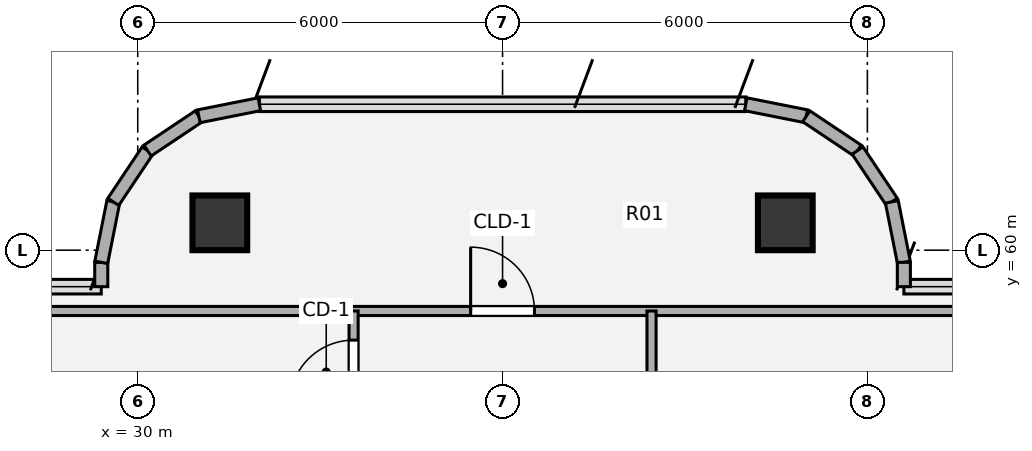
"""IFC4 building model, lengths in metres.
Left out: names, types, materials, properties, quantities, classifications, styles, units other than length and angle.
Written with IfcOpenShell. Run it as: python <this file> out.ifc"""

import sys

from ifc_helpers import new_model, si_unit, direction, frame, frame_2d, origin, origin_2d, place, context, subcontext, project, spatial, rectangle, hollow_circle, extrude, source, transform, mapped, element, fill, save


model = new_model("IFC4")
c1 = context("Model", 3, precision=1e-05, world=origin(), true_north=direction((0.0, 1.0)))
c2 = subcontext(c1, "Body", "Model", "MODEL_VIEW")
j1 = project(units=[si_unit("LENGTHUNIT", "METRE"), si_unit("PLANEANGLEUNIT", "RADIAN")], contexts=[c1])
p1 = place(None, origin())
s1 = spatial("IfcSite", under=j1, at=p1, CompositionType="ELEMENT")
p2 = place(p1, origin())
s2 = spatial("IfcBuilding", under=s1, at=p2, CompositionType="ELEMENT")
p3 = place(p2, frame((0.0, 0.0, 272.16)))
s3 = spatial("IfcBuildingStorey", under=s2, at=p3, CompositionType="ELEMENT", Elevation=272.16)
m1 = source(origin(), c2, "Body", "SweptSolid", [
    extrude(hollow_circle(Radius=0.45, WallThickness=0.032, at=origin_2d()), origin(), (0.0, 0.0, 1.0), 3.78),
])
for number, where, z_axis, x_axis in (
    (1, (31.35, 60.45, 0.0), (0.0, 0.0, 1.0), (1.0, 0.0, 0.0)),
    (2, (40.65, 60.45, 0.0), (0.0, 0.0, 1.0), (1.0, 0.0, 0.0)),
):
    element("IfcColumn", number, at=place(p3, frame(where, z_axis=z_axis, x_axis=x_axis)), inside=s3, PredefinedType="COLUMN", context=c2, shape_type="MappedRepresentation", body=[
        mapped(m1, transform((0.0, 0.0, 0.0), x_axis=(1.0, 0.0, 0.0), y_axis=(0.0, 1.0, 0.0), z_axis=(0.0, 0.0, 1.0), scale=1.0)),
    ])
p4 = place(p3, frame((29.4, 59.4, 0.0), z_axis=(0.0, 0.0, 1.0), x_axis=(0.0, 1.0, 0.0)))
e3 = element("IfcWall", 3, at=p4, inside=s3, PredefinedType="SOLIDWALL", context=c2, shape_type="SweptSolid", body=[
    extrude(rectangle(XDim=0.4, YDim=0.215, at=frame_2d((0.2, 0.0))), origin(), (0.0, 0.0, 1.0), 3.53),
])
p5 = place(p3, frame((29.4, 59.8, 0.0), z_axis=(0.0, 0.0, 1.0), x_axis=(0.195190360752, 0.980765376158, 0.0)))
e4 = element("IfcWall", 4, at=p5, inside=s3, PredefinedType="SOLIDWALL", context=c2, shape_type="SweptSolid", body=[
    extrude(rectangle(XDim=1.014, YDim=0.215, at=frame_2d((0.507, 0.0))), origin(), (0.0, 0.0, 1.0), 3.53),
])
p6 = place(p3, frame((29.598, 60.795, 0.0), z_axis=(0.0, 0.0, 1.0), x_axis=(0.555643898837, 0.831420385657, 0.0)))
e5 = element("IfcWall", 5, at=p6, inside=s3, PredefinedType="SOLIDWALL", context=c2, shape_type="SweptSolid", body=[
    extrude(rectangle(XDim=1.015, YDim=0.215, at=frame_2d((0.507, 0.0))), origin(), (0.0, 0.0, 1.0), 3.53),
])
p7 = place(p3, frame((30.162, 61.638, 0.0), z_axis=(0.0, 0.0, 1.0), x_axis=(0.831346067305, 0.555755086685, 0.0)))
e6 = element("IfcWall", 6, at=p7, inside=s3, PredefinedType="SOLIDWALL", context=c2, shape_type="SweptSolid", body=[
    extrude(rectangle(XDim=1.014, YDim=0.215, at=frame_2d((0.507, 0.0))), origin(), (0.0, 0.0, 1.0), 3.53),
])
for number, where, z_axis, x_axis in (
    (7, (31.005, 62.202, 0.0), (0.0, 0.0, 1.0), (0.981, 0.195, 0.0)),
    (8, (40.0, 62.4, 0.0), (0.0, 0.0, 1.0), (0.981, -0.195, 0.0)),
):
    element("IfcWall", number, at=place(p3, frame(where, z_axis=z_axis, x_axis=x_axis)), inside=s3, PredefinedType="SOLIDWALL", context=c2, shape_type="SweptSolid", body=[
        extrude(rectangle(XDim=1.015, YDim=0.215, at=frame_2d((0.507, 0.0))), origin(), (0.0, 0.0, 1.0), 3.53),
    ])
p8 = place(p3, frame((40.995, 62.202, 0.0), z_axis=(0.0, 0.0, 1.0), x_axis=(0.831346067305, -0.555755086685, 0.0)))
e9 = element("IfcWall", 9, at=p8, inside=s3, PredefinedType="SOLIDWALL", context=c2, shape_type="SweptSolid", body=[
    extrude(rectangle(XDim=1.014, YDim=0.215, at=frame_2d((0.507, 0.0))), origin(), (0.0, 0.0, 1.0), 3.53),
])
p9 = place(p3, frame((41.838, 61.638, 0.0), z_axis=(0.0, 0.0, 1.0), x_axis=(0.555643898837, -0.831420385657, 0.0)))
e10 = element("IfcWall", 10, at=p9, inside=s3, PredefinedType="SOLIDWALL", context=c2, shape_type="SweptSolid", body=[
    extrude(rectangle(XDim=1.015, YDim=0.215, at=frame_2d((0.507, 0.0))), origin(), (0.0, 0.0, 1.0), 3.53),
])
p10 = place(p3, frame((42.402, 60.795, 0.0), z_axis=(0.0, 0.0, 1.0), x_axis=(0.195190360752, -0.980765376158, 0.0)))
e11 = element("IfcWall", 11, at=p10, inside=s3, PredefinedType="SOLIDWALL", context=c2, shape_type="SweptSolid", body=[
    extrude(rectangle(XDim=1.014, YDim=0.215, at=frame_2d((0.507, 0.0))), origin(), (0.0, 0.0, 1.0), 3.53),
])
p11 = place(p3, frame((42.6, 59.8, 0.0), z_axis=(0.0, 0.0, 1.0), x_axis=(0.0, -1.0, 0.0)))
e12 = element("IfcWall", 12, at=p11, inside=s3, PredefinedType="SOLIDWALL", context=c2, shape_type="SweptSolid", body=[
    extrude(rectangle(XDim=0.4, YDim=0.215, at=frame_2d((0.2, 0.0))), origin(), (0.0, 0.0, 1.0), 3.53),
])
p12 = place(p3, frame((27.1, 59.0, 0.0), z_axis=(0.0, 0.0, 1.0), x_axis=(1.0, 0.0, 0.0)))
e13 = element("IfcWall", 13, at=p12, inside=s3, PredefinedType="PARTITIONING", context=c2, shape_type="SweptSolid", body=[
    extrude(rectangle(XDim=17.8, YDim=0.15, at=frame_2d((8.9, 0.0))), origin(), (0.0, 0.0, 1.0), 3.308),
])
p13 = place(p12, frame((8.375, 0.0, 0.0)))
e14 = element("IfcOpeningElement", 14, at=p13, cuts=e13, PredefinedType="OPENING", context=c2, shape_type="SweptSolid", body=[
    extrude(rectangle(XDim=1.05, YDim=2.1, at=origin_2d()), frame((0.525, 0.085, 1.05), z_axis=(0.0, -1.0, 0.0), x_axis=(1.0, 0.0, 0.0)), (0.0, 0.0, 1.0), 0.17),
])
p14 = place(p3, frame((33.55, 56.982, 0.0), z_axis=(0.0, 0.0, 1.0), x_axis=(0.0, 1.0, 0.0)))
e15 = element("IfcWall", 15, at=p14, inside=s3, PredefinedType="PARTITIONING", context=c2, shape_type="SweptSolid", body=[
    extrude(rectangle(XDim=2.018, YDim=0.15, at=frame_2d((1.009, 0.0))), origin(), (0.0, 0.0, 1.0), 3.5),
])
p15 = place(p14, frame((0.489, 0.0, 0.0)))
e16 = element("IfcOpeningElement", 16, at=p15, cuts=e15, PredefinedType="OPENING", context=c2, shape_type="SweptSolid", body=[
    extrude(rectangle(XDim=1.05, YDim=2.1, at=origin_2d()), frame((0.525, 0.085, 1.05), z_axis=(0.0, -1.0, 0.0), x_axis=(1.0, 0.0, 0.0)), (0.0, 0.0, 1.0), 0.17),
])
p16 = place(p3, frame((38.45, 52.04, 0.0), z_axis=(0.0, 0.0, 1.0), x_axis=(0.0, 1.0, 0.0)))
e17 = element("IfcWall", 17, at=p16, inside=s3, PredefinedType="PARTITIONING", context=c2, shape_type="SweptSolid", body=[
    extrude(rectangle(XDim=6.96, YDim=0.15, at=frame_2d((3.48, 0.0))), origin(), (0.0, 0.0, 1.0), 3.5),
])
p17 = place(p16, frame((2.955, 0.0, 0.0)))
e18 = element("IfcOpeningElement", 18, at=p17, cuts=e17, PredefinedType="OPENING", context=c2, shape_type="SweptSolid", body=[
    extrude(rectangle(XDim=1.05, YDim=2.1, at=origin_2d()), frame((0.525, 0.085, 1.05), z_axis=(0.0, -1.0, 0.0), x_axis=(1.0, 0.0, 0.0)), (0.0, 0.0, 1.0), 0.17),
])
m2 = source(origin(), c2, "Body", "SweptSolid", [
    extrude(rectangle(XDim=1.05, YDim=2.1, at=origin_2d()), frame((0.525, 0.025, 1.05), z_axis=(0.0, -1.0, 0.0), x_axis=(1.0, 0.0, 0.0)), (0.0, 0.0, 1.0), 0.05),
])
p18 = place(p13, origin())
e19 = element("IfcDoor", 19, at=p18, inside=s3, OperationType="SINGLE_SWING_LEFT", PredefinedType="DOOR", context=c2, shape_type="MappedRepresentation", body=[
    mapped(m2, transform((0.0, 0.0, 0.0), x_axis=(1.0, 0.0, 0.0), y_axis=(0.0, 1.0, 0.0), z_axis=(0.0, 0.0, 1.0), scale=1.0)),
])
fill(e14, e19)
m3 = source(origin(), c2, "Body", "SweptSolid", [
    extrude(rectangle(XDim=1.05, YDim=2.1, at=origin_2d()), frame((0.525, 0.025, 1.05), z_axis=(0.0, -1.0, 0.0), x_axis=(1.0, 0.0, 0.0)), (0.0, 0.0, 1.0), 0.05),
])
p19 = place(p15, origin())
e20 = element("IfcDoor", 20, at=p19, inside=s3, OperationType="SINGLE_SWING_LEFT", PredefinedType="DOOR", context=c2, shape_type="MappedRepresentation", body=[
    mapped(m3, transform((0.0, 0.0, 0.0), x_axis=(1.0, 0.0, 0.0), y_axis=(0.0, 1.0, 0.0), z_axis=(0.0, 0.0, 1.0), scale=1.0)),
])
fill(e16, e20)
save(model, sys.argv[1])
